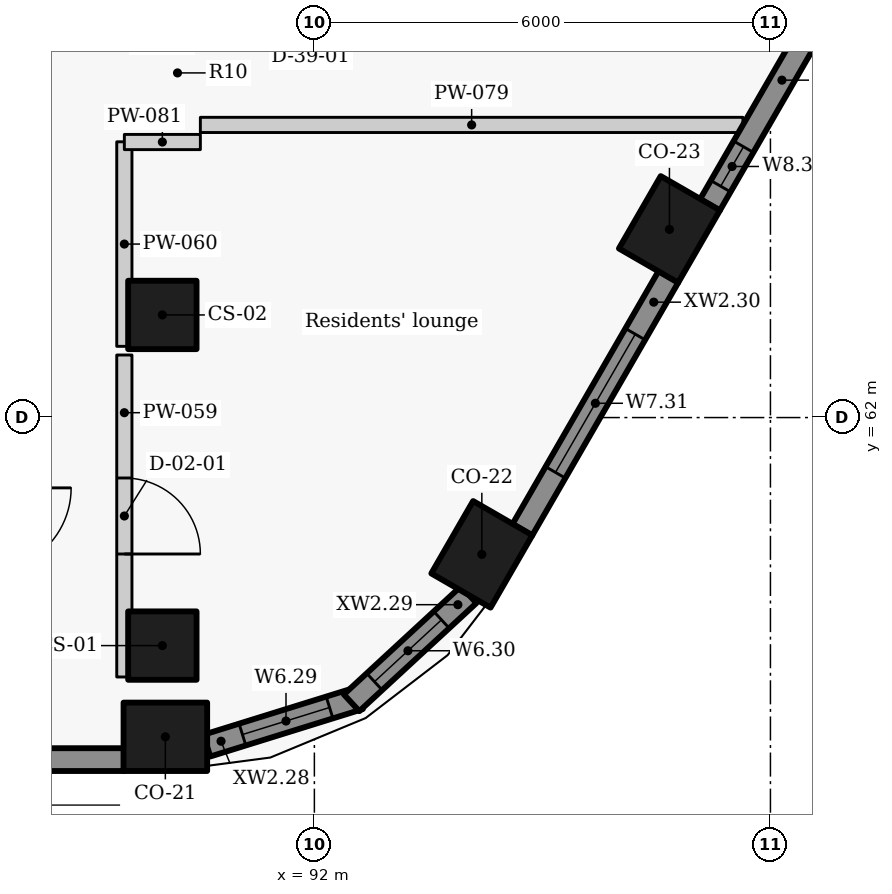
"""IFC4 building model, lengths in metres.
Left out: names, types, materials, properties, quantities, classifications, styles, units other than length and angle.
Written with IfcOpenShell. Run it as: python <this file> out.ifc"""

import sys

from ifc_helpers import new_model, si_unit, direction, frame, frame_2d, origin, origin_2d, place, context, subcontext, project, spatial, rectangle, extrude, element, fill, save


model = new_model("IFC4")
c1 = context("Model", 3, precision=1e-05, world=origin(), true_north=direction((0.0, 1.0)))
c2 = subcontext(c1, "Body", "Model", "MODEL_VIEW")
j1 = project(units=[si_unit("LENGTHUNIT", "METRE"), si_unit("PLANEANGLEUNIT", "RADIAN")], contexts=[c1])
p1 = place(None, origin())
s1 = spatial("IfcSite", under=j1, at=p1, CompositionType="ELEMENT")
p2 = place(p1, origin())
s2 = spatial("IfcBuilding", under=s1, at=p2, CompositionType="ELEMENT")
p3 = place(p2, frame((0.0, 0.0, 269.1)))
s3 = spatial("IfcBuildingStorey", under=s2, at=p3, CompositionType="ELEMENT", Elevation=269.1)
for number, where, z_axis, x_axis in (
    (1, (90.04, 57.8, 0.0), (0.0, 0.0, 1.0), (1.0, 0.0, 0.0)),
    (2, (94.203, 60.2, 0.0), (0.0, 0.0, 1.0), (0.5, 0.866, 0.0)),
    (3, (96.671, 64.475, 0.0), (0.0, 0.0, 1.0), (0.5, 0.866, 0.0)),
):
    element("IfcColumn", number, at=place(p3, frame(where, z_axis=z_axis, x_axis=x_axis)), inside=s3, PredefinedType="COLUMN", context=c2, shape_type="SweptSolid", body=[
        extrude(rectangle(XDim=1.1, YDim=0.9, at=origin_2d()), origin(), (0.0, 0.0, 1.0), 3.3),
    ])
for number, where, z_axis, x_axis in (
    (4, (90.0, 59.0, 0.0), (0.0, 0.0, 1.0), (0.0, 1.0, 0.0)),
    (5, (90.0, 63.35, 0.0), (0.0, 0.0, 1.0), (0.0, 1.0, 0.0)),
):
    element("IfcColumn", number, at=place(p3, frame(where, z_axis=z_axis, x_axis=x_axis)), inside=s3, PredefinedType="COLUMN", context=c2, shape_type="SweptSolid", body=[
        extrude(rectangle(XDim=0.9, YDim=0.9, at=origin_2d()), origin(), (0.0, 0.0, 1.0), 3.3),
    ])
p4 = place(p3, frame((70.501, 57.5, 0.0), z_axis=(0.0, 0.0, 1.0), x_axis=(1.0, 0.0, 0.0)))
e6 = element("IfcWall", 6, at=p4, inside=s3, PredefinedType="SOLIDWALL", context=c2, shape_type="SweptSolid", body=[
    extrude(rectangle(XDim=18.993, YDim=0.3, at=frame_2d((9.496, 0.0))), origin(), (0.0, 0.0, 1.0), 2.125),
])
p5 = place(p3, frame((90.586, 57.684, 0.0), z_axis=(0.0, 0.0, 1.0), x_axis=(0.954941641926, 0.296793632875, 0.0)))
e7 = element("IfcWall", 7, at=p5, inside=s3, PredefinedType="SOLIDWALL", context=c2, shape_type="SweptSolid", body=[
    extrude(rectangle(XDim=2.103, YDim=0.3, at=frame_2d((1.051, 0.0))), origin(), (0.0, 0.0, 1.0), 2.125),
])
p6 = place(p5, frame((0.49, 0.0, 0.9)))
e8 = element("IfcOpeningElement", 8, at=p6, cuts=e7, PredefinedType="OPENING", context=c2, shape_type="SweptSolid", body=[
    extrude(rectangle(XDim=1.2, YDim=1.1, at=frame_2d((0.6, 0.55))), frame((0.0, 0.16, 0.0), z_axis=(0.0, -1.0, 0.0), x_axis=(1.0, 0.0, 0.0)), (0.0, 0.0, 1.0), 0.32),
])
p7 = place(p3, frame((92.49, 58.247, 0.0), z_axis=(0.0, 0.0, 1.0), x_axis=(0.734830223907, 0.678251090698, 0.0)))
e9 = element("IfcWall", 9, at=p7, inside=s3, PredefinedType="SOLIDWALL", context=c2, shape_type="SweptSolid", body=[
    extrude(rectangle(XDim=2.097, YDim=0.3, at=frame_2d((1.049, 0.0))), origin(), (0.0, 0.0, 1.0), 2.125),
])
p8 = place(p7, frame((0.409, 0.0, 0.9)))
e10 = element("IfcOpeningElement", 10, at=p8, cuts=e9, PredefinedType="OPENING", context=c2, shape_type="SweptSolid", body=[
    extrude(rectangle(XDim=1.2, YDim=1.1, at=frame_2d((0.6, 0.55))), frame((0.0, 0.16, 0.0), z_axis=(0.0, -1.0, 0.0), x_axis=(1.0, 0.0, 0.0)), (0.0, 0.0, 1.0), 0.32),
])
p9 = place(p3, frame((94.736, 60.523, 0.0), z_axis=(0.0, 0.0, 1.0), x_axis=(0.499984490703, 0.866034357896, 0.0)))
e11 = element("IfcWall", 11, at=p9, inside=s3, PredefinedType="SOLIDWALL", context=c2, shape_type="SweptSolid", body=[
    extrude(rectangle(XDim=3.844, YDim=0.3, at=frame_2d((1.922, 0.0))), origin(), (0.0, 0.0, 1.0), 2.125),
])
p10 = place(p9, frame((0.872, 0.0, 0.9)))
e12 = element("IfcOpeningElement", 12, at=p10, cuts=e11, PredefinedType="OPENING", context=c2, shape_type="SweptSolid", body=[
    extrude(rectangle(XDim=2.1, YDim=1.1, at=frame_2d((1.05, 0.55))), frame((0.0, 0.16, 0.0), z_axis=(0.0, -1.0, 0.0), x_axis=(1.0, 0.0, 0.0)), (0.0, 0.0, 1.0), 0.32),
])
p11 = place(p3, frame((97.204, 64.798, 0.0), z_axis=(0.0, 0.0, 1.0), x_axis=(0.499984490703, 0.866034357896, 0.0)))
e13 = element("IfcWall", 13, at=p11, inside=s3, PredefinedType="SOLIDWALL", context=c2, shape_type="SweptSolid", body=[
    extrude(rectangle(XDim=3.844, YDim=0.3, at=frame_2d((1.922, 0.0))), origin(), (0.0, 0.0, 1.0), 2.125),
])
p12 = place(p11, frame((0.283, 0.0, 0.9)))
e14 = element("IfcOpeningElement", 14, at=p12, cuts=e13, PredefinedType="OPENING", context=c2, shape_type="SweptSolid", body=[
    extrude(rectangle(XDim=0.6, YDim=1.1, at=frame_2d((0.3, 0.55))), frame((0.0, 0.16, 0.0), z_axis=(0.0, -1.0, 0.0), x_axis=(1.0, 0.0, 0.0)), (0.0, 0.0, 1.0), 0.32),
])
p13 = place(p11, frame((2.906, 0.0, 0.9)))
e15 = element("IfcOpeningElement", 15, at=p13, cuts=e13, PredefinedType="OPENING", context=c2, shape_type="SweptSolid", body=[
    extrude(rectangle(XDim=0.6, YDim=1.1, at=frame_2d((0.3, 0.55))), frame((0.0, 0.16, 0.0), z_axis=(0.0, -1.0, 0.0), x_axis=(1.0, 0.0, 0.0)), (0.0, 0.0, 1.0), 0.32),
])
p14 = place(p3, frame((89.5, 62.823, 0.0), z_axis=(0.0, 0.0, 1.0), x_axis=(0.0, -1.0, 0.0)))
e16 = element("IfcWall", 16, at=p14, inside=s3, PredefinedType="PARTITIONING", context=c2, shape_type="SweptSolid", body=[
    extrude(rectangle(XDim=4.236, YDim=0.2, at=frame_2d((2.118, 0.0))), origin(), (0.0, 0.0, 1.0), 3.025),
])
p15 = place(p14, frame((1.618, 0.0, 0.0)))
e17 = element("IfcOpeningElement", 17, at=p15, cuts=e16, PredefinedType="OPENING", context=c2, shape_type="SweptSolid", body=[
    extrude(rectangle(XDim=1.0, YDim=2.1, at=frame_2d((0.5, 1.05))), frame((0.0, 0.11, 0.0), z_axis=(0.0, -1.0, 0.0), x_axis=(1.0, 0.0, 0.0)), (0.0, 0.0, 1.0), 0.22),
])
p16 = place(p3, frame((89.5, 62.937, 0.0), z_axis=(0.0, 0.0, 1.0), x_axis=(0.0, 1.0, 0.0)))
e18 = element("IfcWall", 18, at=p16, inside=s3, PredefinedType="PARTITIONING", context=c2, shape_type="SweptSolid", body=[
    extrude(rectangle(XDim=2.691, YDim=0.2, at=frame_2d((1.345, 0.0))), origin(), (0.0, 0.0, 1.0), 3.025),
])
p17 = place(p3, frame((90.5, 65.85, 0.0), z_axis=(0.0, 0.0, 1.0), x_axis=(1.0, 0.0, 0.0)))
e19 = element("IfcWall", 19, at=p17, inside=s3, PredefinedType="PARTITIONING", context=c2, shape_type="SweptSolid", body=[
    extrude(rectangle(XDim=7.138, YDim=0.2, at=frame_2d((3.569, 0.0))), origin(), (0.0, 0.0, 1.0), 2.105),
])
p18 = place(p3, frame((89.5, 65.625, 0.0), z_axis=(0.0, 0.0, 1.0), x_axis=(1.0, 0.0, 0.0)))
e20 = element("IfcWall", 20, at=p18, inside=s3, PredefinedType="PARTITIONING", context=c2, shape_type="SweptSolid", body=[
    extrude(rectangle(XDim=1.0, YDim=0.2, at=frame_2d((0.5, 0.0))), origin(), (0.0, 0.0, 1.0), 2.505),
])
p19 = place(p6, origin())
e21 = element("IfcWindow", 21, at=p19, inside=s3, PartitioningType="SINGLE_PANEL", PredefinedType="WINDOW", context=c2, shape_type="SweptSolid", body=[
    extrude(rectangle(XDim=1.2, YDim=1.1, at=frame_2d((0.6, 0.55))), frame((0.0, 0.03, 0.0), z_axis=(0.0, -1.0, 0.0), x_axis=(1.0, 0.0, 0.0)), (0.0, 0.0, 1.0), 0.06),
])
fill(e8, e21)
p20 = place(p8, origin())
e22 = element("IfcWindow", 22, at=p20, inside=s3, PartitioningType="SINGLE_PANEL", PredefinedType="WINDOW", context=c2, shape_type="SweptSolid", body=[
    extrude(rectangle(XDim=1.2, YDim=1.1, at=frame_2d((0.6, 0.55))), frame((0.0, 0.03, 0.0), z_axis=(0.0, -1.0, 0.0), x_axis=(1.0, 0.0, 0.0)), (0.0, 0.0, 1.0), 0.06),
])
fill(e10, e22)
p21 = place(p10, origin())
e23 = element("IfcWindow", 23, at=p21, inside=s3, PartitioningType="SINGLE_PANEL", PredefinedType="WINDOW", context=c2, shape_type="SweptSolid", body=[
    extrude(rectangle(XDim=2.1, YDim=1.1, at=frame_2d((1.05, 0.55))), frame((0.0, 0.03, 0.0), z_axis=(0.0, -1.0, 0.0), x_axis=(1.0, 0.0, 0.0)), (0.0, 0.0, 1.0), 0.06),
])
fill(e12, e23)
p22 = place(p12, origin())
e24 = element("IfcWindow", 24, at=p22, inside=s3, PartitioningType="SINGLE_PANEL", PredefinedType="WINDOW", context=c2, shape_type="SweptSolid", body=[
    extrude(rectangle(XDim=0.6, YDim=1.1, at=frame_2d((0.3, 0.55))), frame((0.0, 0.03, 0.0), z_axis=(0.0, -1.0, 0.0), x_axis=(1.0, 0.0, 0.0)), (0.0, 0.0, 1.0), 0.06),
])
fill(e14, e24)
p23 = place(p15, origin())
e25 = element("IfcDoor", 25, at=p23, inside=s3, OperationType="SINGLE_SWING_RIGHT", PredefinedType="DOOR", context=c2, shape_type="SweptSolid", body=[
    extrude(rectangle(XDim=1.0, YDim=2.1, at=frame_2d((0.5, 1.05))), frame((0.0, 0.025, 0.0), z_axis=(0.0, -1.0, 0.0), x_axis=(1.0, 0.0, 0.0)), (0.0, 0.0, 1.0), 0.05),
])
fill(e17, e25)
save(model, sys.argv[1])
